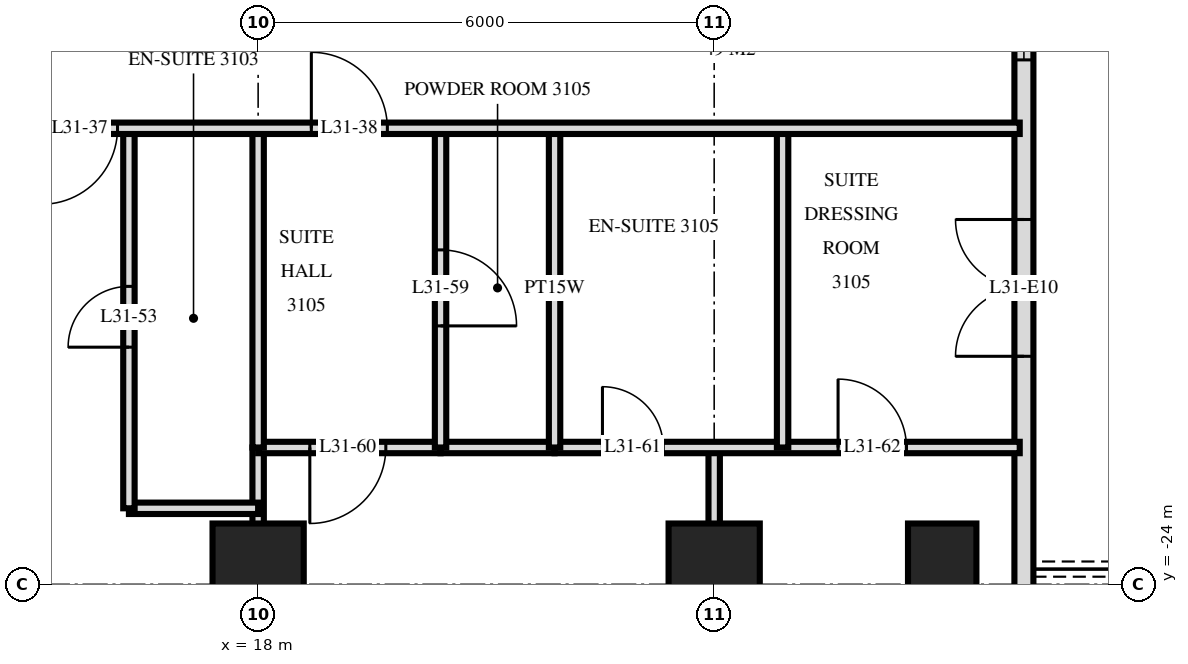
"""IFC4 building model, lengths in metres.
Left out: names, types, materials, properties, quantities, classifications, styles, units other than length and angle.
Written with IfcOpenShell. Run it as: python <this file> out.ifc"""

import sys

from ifc_helpers import new_model, si_unit, direction, frame, frame_2d, origin, origin_2d, place, context, subcontext, project, spatial, rectangle, extrude, element, fill, save


model = new_model("IFC4")
c1 = context("Model", 3, precision=1e-05, world=origin(), true_north=direction((0.0, 1.0)))
c2 = subcontext(c1, "Body", "Model", "MODEL_VIEW")
j1 = project(units=[si_unit("LENGTHUNIT", "METRE"), si_unit("PLANEANGLEUNIT", "RADIAN")], contexts=[c1])
p1 = place(None, origin())
s1 = spatial("IfcSite", under=j1, at=p1, CompositionType="ELEMENT")
p2 = place(p1, origin())
s2 = spatial("IfcBuilding", under=s1, at=p2, CompositionType="ELEMENT")
p3 = place(p2, frame((0.0, 0.0, 123.6)))
s3 = spatial("IfcBuildingStorey", under=s2, at=p3, CompositionType="ELEMENT", Elevation=123.6)
for number, where, z_axis, x_axis in (
    (1, (18.0, -23.8, 0.0), (0.0, 0.0, 1.0), (1.0, 0.0, 0.0)),
    (2, (24.0, -23.8, 0.0), (0.0, 0.0, 1.0), (1.0, 0.0, 0.0)),
):
    element("IfcColumn", number, at=place(p3, frame(where, z_axis=z_axis, x_axis=x_axis)), inside=s3, PredefinedType="COLUMN", context=c2, shape_type="SweptSolid", body=[
        extrude(rectangle(XDim=1.2, YDim=1.2, at=origin_2d()), origin(), (0.0, 0.0, 1.0), 3.6),
    ])
p4 = place(p3, frame((27.0, -23.8, 0.0), z_axis=(0.0, 0.0, 1.0), x_axis=(0.0, 1.0, 0.0)))
e3 = element("IfcColumn", 3, at=p4, inside=s3, PredefinedType="COLUMN", context=c2, shape_type="SweptSolid", body=[
    extrude(rectangle(XDim=1.2, YDim=0.9, at=origin_2d()), origin(), (0.0, 0.0, 1.0), 3.6),
])
p5 = place(p3, frame((28.075, -29.275, 0.0), z_axis=(0.0, 0.0, 1.0), x_axis=(0.0, 1.0, 0.0)))
e4 = element("IfcWall", 4, at=p5, inside=s3, PredefinedType="SOLIDWALL", context=c2, shape_type="SweptSolid", body=[
    extrude(rectangle(XDim=25.951, YDim=0.25, at=frame_2d((12.975, 0.0))), origin(), (0.0, 0.0, 1.0), 3.32),
])
p6 = place(p5, frame((0.575, 0.0, 0.0)))
e5 = element("IfcOpeningElement", 5, at=p6, cuts=e4, PredefinedType="OPENING", context=c2, shape_type="SweptSolid", body=[
    extrude(rectangle(XDim=1.8, YDim=2.4, at=frame_2d((0.9, 1.2))), frame((0.0, 0.135, 0.0), z_axis=(0.0, -1.0, 0.0), x_axis=(1.0, 0.0, 0.0)), (0.0, 0.0, 1.0), 0.27),
])
p7 = place(p5, frame((3.325, 0.0, 0.3)))
e6 = element("IfcOpeningElement", 6, at=p7, cuts=e4, PredefinedType="OPENING", context=c2, shape_type="SweptSolid", body=[
    extrude(rectangle(XDim=1.8, YDim=2.1, at=frame_2d((0.9, 1.05))), frame((0.0, 0.135, 0.0), z_axis=(0.0, -1.0, 0.0), x_axis=(1.0, 0.0, 0.0)), (0.0, 0.0, 1.0), 0.27),
])
p8 = place(p5, frame((8.275, 0.0, 0.0)))
e7 = element("IfcOpeningElement", 7, at=p8, cuts=e4, PredefinedType="OPENING", context=c2, shape_type="SweptSolid", body=[
    extrude(rectangle(XDim=1.8, YDim=2.4, at=frame_2d((0.9, 1.2))), frame((0.0, 0.135, 0.0), z_axis=(0.0, -1.0, 0.0), x_axis=(1.0, 0.0, 0.0)), (0.0, 0.0, 1.0), 0.27),
])
p9 = place(p5, frame((12.175, 0.0, 0.3)))
e8 = element("IfcOpeningElement", 8, at=p9, cuts=e4, PredefinedType="OPENING", context=c2, shape_type="SweptSolid", body=[
    extrude(rectangle(XDim=1.2, YDim=2.1, at=frame_2d((0.6, 1.05))), frame((0.0, 0.135, 0.0), z_axis=(0.0, -1.0, 0.0), x_axis=(1.0, 0.0, 0.0)), (0.0, 0.0, 1.0), 0.27),
])
p10 = place(p5, frame((16.375, 0.0, 0.0)))
e9 = element("IfcOpeningElement", 9, at=p10, cuts=e4, PredefinedType="OPENING", context=c2, shape_type="SweptSolid", body=[
    extrude(rectangle(XDim=1.8, YDim=2.4, at=frame_2d((0.9, 1.2))), frame((0.0, 0.135, 0.0), z_axis=(0.0, -1.0, 0.0), x_axis=(1.0, 0.0, 0.0)), (0.0, 0.0, 1.0), 0.27),
])
p11 = place(p3, frame((24.9, -22.2, 0.0), z_axis=(0.0, 0.0, 1.0), x_axis=(0.0, 1.0, 0.0)))
e10 = element("IfcWall", 10, at=p11, inside=s3, PredefinedType="PARTITIONING", context=c2, shape_type="SweptSolid", body=[
    extrude(rectangle(XDim=4.2, YDim=0.15, at=frame_2d((2.1, 0.0))), origin(), (0.0, 0.0, 1.0), 3.32),
])
p12 = place(p3, frame((24.0, -33.557, 0.0), z_axis=(0.0, 0.0, 1.0), x_axis=(0.0, 1.0, 0.0)))
e11 = element("IfcWall", 11, at=p12, inside=s3, PredefinedType="PARTITIONING", context=c2, shape_type="SweptSolid", body=[
    extrude(rectangle(XDim=11.357, YDim=0.15, at=frame_2d((5.678, 0.0))), origin(), (0.0, 0.0, 1.0), 3.32),
])
p13 = place(p12, frame((5.137, 0.0, 0.0)))
e12 = element("IfcOpeningElement", 12, at=p13, cuts=e11, PredefinedType="OPENING", context=c2, shape_type="SweptSolid", body=[
    extrude(rectangle(XDim=0.9, YDim=2.1, at=frame_2d((0.45, 1.05))), frame((0.0, 0.085, 0.0), z_axis=(0.0, -1.0, 0.0), x_axis=(1.0, 0.0, 0.0)), (0.0, 0.0, 1.0), 0.17),
])
p14 = place(p3, frame((21.9, -22.2, 0.0), z_axis=(0.0, 0.0, 1.0), x_axis=(0.0, 1.0, 0.0)))
e13 = element("IfcWall", 13, at=p14, inside=s3, PredefinedType="PLUMBINGWALL", context=c2, shape_type="SweptSolid", body=[
    extrude(rectangle(XDim=4.2, YDim=0.15, at=frame_2d((2.1, 0.0))), origin(), (0.0, 0.0, 1.0), 3.32),
])
p15 = place(p3, frame((20.4, -22.2, 0.0), z_axis=(0.0, 0.0, 1.0), x_axis=(0.0, 1.0, 0.0)))
e14 = element("IfcWall", 14, at=p15, inside=s3, PredefinedType="PARTITIONING", context=c2, shape_type="SweptSolid", body=[
    extrude(rectangle(XDim=4.2, YDim=0.15, at=frame_2d((2.1, 0.0))), origin(), (0.0, 0.0, 1.0), 3.32),
])
p16 = place(p15, frame((1.6, 0.0, 0.0)))
e15 = element("IfcOpeningElement", 15, at=p16, cuts=e14, PredefinedType="OPENING", context=c2, shape_type="SweptSolid", body=[
    extrude(rectangle(XDim=1.0, YDim=2.1, at=frame_2d((0.5, 1.05))), frame((0.0, 0.085, 0.0), z_axis=(0.0, -1.0, 0.0), x_axis=(1.0, 0.0, 0.0)), (0.0, 0.0, 1.0), 0.17),
])
p17 = place(p3, frame((18.0, -22.2, 0.0), z_axis=(0.0, 0.0, 1.0), x_axis=(0.0, 1.0, 0.0)))
e16 = element("IfcWall", 16, at=p17, inside=s3, PredefinedType="PARTITIONING", context=c2, shape_type="SweptSolid", body=[
    extrude(rectangle(XDim=4.2, YDim=0.15, at=frame_2d((2.1, 0.0))), origin(), (0.0, 0.0, 1.0), 3.32),
])
p18 = place(p3, frame((18.0, -33.62, 0.0), z_axis=(0.0, 0.0, 1.0), x_axis=(0.0, 1.0, 0.0)))
e17 = element("IfcWall", 17, at=p18, inside=s3, PredefinedType="PARTITIONING", context=c2, shape_type="SweptSolid", body=[
    extrude(rectangle(XDim=11.42, YDim=0.15, at=frame_2d((5.71, 0.0))), origin(), (0.0, 0.0, 1.0), 3.32),
])
p19 = place(p3, frame((16.3, -23.0, 0.0), z_axis=(0.0, 0.0, 1.0), x_axis=(0.0, 1.0, 0.0)))
e18 = element("IfcWall", 18, at=p19, inside=s3, PredefinedType="PARTITIONING", context=c2, shape_type="SweptSolid", body=[
    extrude(rectangle(XDim=5.0, YDim=0.15, at=frame_2d((2.5, 0.0))), origin(), (0.0, 0.0, 1.0), 3.32),
])
p20 = place(p19, frame((2.12, 0.0, 0.0)))
e19 = element("IfcOpeningElement", 19, at=p20, cuts=e18, PredefinedType="OPENING", context=c2, shape_type="SweptSolid", body=[
    extrude(rectangle(XDim=0.8, YDim=2.1, at=frame_2d((0.4, 1.05))), frame((0.0, 0.085, 0.0), z_axis=(0.0, -1.0, 0.0), x_axis=(1.0, 0.0, 0.0)), (0.0, 0.0, 1.0), 0.17),
])
p21 = place(p3, frame((16.3, -23.0, 0.0), z_axis=(0.0, 0.0, 1.0), x_axis=(1.0, 0.0, 0.0)))
e20 = element("IfcWall", 20, at=p21, inside=s3, PredefinedType="PARTITIONING", context=c2, shape_type="SweptSolid", body=[
    extrude(rectangle(XDim=1.7, YDim=0.15, at=frame_2d((0.85, 0.0))), origin(), (0.0, 0.0, 1.0), 3.32),
])
p22 = place(p3, frame((18.0, -22.2, 0.0), z_axis=(0.0, 0.0, 1.0), x_axis=(1.0, 0.0, 0.0)))
e21 = element("IfcWall", 21, at=p22, inside=s3, PredefinedType="PARTITIONING", context=c2, shape_type="SweptSolid", body=[
    extrude(rectangle(XDim=2.4, YDim=0.15, at=frame_2d((1.2, 0.0))), origin(), (0.0, 0.0, 1.0), 3.32),
])
p23 = place(p22, frame((0.68, 0.0, 0.0)))
e22 = element("IfcOpeningElement", 22, at=p23, cuts=e21, PredefinedType="OPENING", context=c2, shape_type="SweptSolid", body=[
    extrude(rectangle(XDim=1.0, YDim=2.1, at=frame_2d((0.5, 1.05))), frame((0.0, 0.085, 0.0), z_axis=(0.0, -1.0, 0.0), x_axis=(1.0, 0.0, 0.0)), (0.0, 0.0, 1.0), 0.17),
])
p24 = place(p3, frame((21.9, -22.2, 0.0), z_axis=(0.0, 0.0, 1.0), x_axis=(1.0, 0.0, 0.0)))
e23 = element("IfcWall", 23, at=p24, inside=s3, PredefinedType="PARTITIONING", context=c2, shape_type="SweptSolid", body=[
    extrude(rectangle(XDim=6.12, YDim=0.15, at=frame_2d((3.06, 0.0))), origin(), (0.0, 0.0, 1.0), 3.32),
])
p25 = place(p24, frame((0.63, 0.0, 0.0)))
e24 = element("IfcOpeningElement", 24, at=p25, cuts=e23, PredefinedType="OPENING", context=c2, shape_type="SweptSolid", body=[
    extrude(rectangle(XDim=0.8, YDim=2.1, at=frame_2d((0.4, 1.05))), frame((0.0, 0.085, 0.0), z_axis=(0.0, -1.0, 0.0), x_axis=(1.0, 0.0, 0.0)), (0.0, 0.0, 1.0), 0.17),
])
p26 = place(p24, frame((3.73, 0.0, 0.0)))
e25 = element("IfcOpeningElement", 25, at=p26, cuts=e23, PredefinedType="OPENING", context=c2, shape_type="SweptSolid", body=[
    extrude(rectangle(XDim=0.9, YDim=2.1, at=frame_2d((0.45, 1.05))), frame((0.0, 0.085, 0.0), z_axis=(0.0, -1.0, 0.0), x_axis=(1.0, 0.0, 0.0)), (0.0, 0.0, 1.0), 0.17),
])
p27 = place(p3, frame((20.4, -22.2, 0.0), z_axis=(0.0, 0.0, 1.0), x_axis=(1.0, 0.0, 0.0)))
e26 = element("IfcWall", 26, at=p27, inside=s3, PredefinedType="PLUMBINGWALL", context=c2, shape_type="SweptSolid", body=[
    extrude(rectangle(XDim=1.5, YDim=0.15, at=frame_2d((0.75, 0.0))), origin(), (0.0, 0.0, 1.0), 3.32),
])
p28 = place(p3, frame((-28.02, -18.0, 0.0), z_axis=(0.0, 0.0, 1.0), x_axis=(1.0, 0.0, 0.0)))
e27 = element("IfcWall", 27, at=p28, inside=s3, PredefinedType="PARTITIONING", context=c2, shape_type="SweptSolid", body=[
    extrude(rectangle(XDim=56.04, YDim=0.15, at=frame_2d((28.02, 0.0))), origin(), (0.0, 0.0, 1.0), 3.32),
])
p29 = place(p28, frame((13.17, 0.0, 0.0)))
e28 = element("IfcOpeningElement", 28, at=p29, cuts=e27, PredefinedType="OPENING", context=c2, shape_type="SweptSolid", body=[
    extrude(rectangle(XDim=1.0, YDim=2.1, at=frame_2d((0.5, 1.05))), frame((0.0, 0.085, 0.0), z_axis=(0.0, -1.0, 0.0), x_axis=(1.0, 0.0, 0.0)), (0.0, 0.0, 1.0), 0.17),
])
p30 = place(p28, frame((11.32, 0.0, 0.0)))
e29 = element("IfcOpeningElement", 29, at=p30, cuts=e27, PredefinedType="OPENING", context=c2, shape_type="SweptSolid", body=[
    extrude(rectangle(XDim=1.0, YDim=2.1, at=frame_2d((0.5, 1.05))), frame((0.0, 0.085, 0.0), z_axis=(0.0, -1.0, 0.0), x_axis=(1.0, 0.0, 0.0)), (0.0, 0.0, 1.0), 0.17),
])
p31 = place(p28, frame((41.87, 0.0, 0.0)))
e30 = element("IfcOpeningElement", 30, at=p31, cuts=e27, PredefinedType="OPENING", context=c2, shape_type="SweptSolid", body=[
    extrude(rectangle(XDim=1.0, YDim=2.1, at=frame_2d((0.5, 1.05))), frame((0.0, 0.085, 0.0), z_axis=(0.0, -1.0, 0.0), x_axis=(1.0, 0.0, 0.0)), (0.0, 0.0, 1.0), 0.17),
])
p32 = place(p28, frame((43.17, 0.0, 0.0)))
e31 = element("IfcOpeningElement", 31, at=p32, cuts=e27, PredefinedType="OPENING", context=c2, shape_type="SweptSolid", body=[
    extrude(rectangle(XDim=1.0, YDim=2.1, at=frame_2d((0.5, 1.05))), frame((0.0, 0.085, 0.0), z_axis=(0.0, -1.0, 0.0), x_axis=(1.0, 0.0, 0.0)), (0.0, 0.0, 1.0), 0.17),
])
p33 = place(p28, frame((46.72, 0.0, 0.0)))
e32 = element("IfcOpeningElement", 32, at=p33, cuts=e27, PredefinedType="OPENING", context=c2, shape_type="SweptSolid", body=[
    extrude(rectangle(XDim=1.0, YDim=2.1, at=frame_2d((0.5, 1.05))), frame((0.0, 0.085, 0.0), z_axis=(0.0, -1.0, 0.0), x_axis=(1.0, 0.0, 0.0)), (0.0, 0.0, 1.0), 0.17),
])
p34 = place(p28, frame((21.52, 0.0, 0.0)))
e33 = element("IfcOpeningElement", 33, at=p34, cuts=e27, PredefinedType="OPENING", context=c2, shape_type="SweptSolid", body=[
    extrude(rectangle(XDim=1.0, YDim=2.1, at=frame_2d((0.5, 1.05))), frame((0.0, 0.085, 0.0), z_axis=(0.0, -1.0, 0.0), x_axis=(1.0, 0.0, 0.0)), (0.0, 0.0, 1.0), 0.17),
])
p35 = place(p28, frame((33.52, 0.0, 0.0)))
e34 = element("IfcOpeningElement", 34, at=p35, cuts=e27, PredefinedType="OPENING", context=c2, shape_type="SweptSolid", body=[
    extrude(rectangle(XDim=1.0, YDim=2.1, at=frame_2d((0.5, 1.05))), frame((0.0, 0.085, 0.0), z_axis=(0.0, -1.0, 0.0), x_axis=(1.0, 0.0, 0.0)), (0.0, 0.0, 1.0), 0.17),
])
p36 = place(p8, origin())
e35 = element("IfcDoor", 35, at=p36, inside=s3, OperationType="DOUBLE_DOOR_SINGLE_SWING", PredefinedType="DOOR", context=c2, shape_type="SweptSolid", body=[
    extrude(rectangle(XDim=1.8, YDim=2.4, at=frame_2d((0.9, 1.2))), frame((0.0, 0.025, 0.0), z_axis=(0.0, -1.0, 0.0), x_axis=(1.0, 0.0, 0.0)), (0.0, 0.0, 1.0), 0.05),
])
fill(e7, e35)
p37 = place(p9, origin())
e36 = element("IfcWindow", 36, at=p37, inside=s3, PartitioningType="SINGLE_PANEL", PredefinedType="WINDOW", context=c2, shape_type="SweptSolid", body=[
    extrude(rectangle(XDim=1.2, YDim=2.1, at=frame_2d((0.6, 1.05))), frame((0.0, 0.03, 0.0), z_axis=(0.0, -1.0, 0.0), x_axis=(1.0, 0.0, 0.0)), (0.0, 0.0, 1.0), 0.06),
])
fill(e8, e36)
p38 = place(p32, frame((0.5, 0.0, 0.0), z_axis=(0.0, 0.0, 1.0), x_axis=(-1.0, 0.0, 0.0)))
e37 = element("IfcDoor", 37, at=p38, inside=s3, OperationType="SINGLE_SWING_LEFT", PredefinedType="DOOR", context=c2, shape_type="SweptSolid", body=[
    extrude(rectangle(XDim=1.0, YDim=2.1, at=frame_2d((0.0, 1.05))), frame((0.0, -0.025, 0.0), z_axis=(0.0, 1.0, 0.0), x_axis=(-1.0, 0.0, 0.0)), (0.0, 0.0, 1.0), 0.05),
])
fill(e31, e37)
p39 = place(p33, origin())
e38 = element("IfcDoor", 38, at=p39, inside=s3, OperationType="SINGLE_SWING_RIGHT", PredefinedType="DOOR", context=c2, shape_type="SweptSolid", body=[
    extrude(rectangle(XDim=1.0, YDim=2.1, at=frame_2d((0.5, 1.05))), frame((0.0, 0.025, 0.0), z_axis=(0.0, -1.0, 0.0), x_axis=(1.0, 0.0, 0.0)), (0.0, 0.0, 1.0), 0.05),
])
fill(e32, e38)
p40 = place(p20, origin())
e39 = element("IfcDoor", 39, at=p40, inside=s3, OperationType="SINGLE_SWING_RIGHT", PredefinedType="DOOR", context=c2, shape_type="SweptSolid", body=[
    extrude(rectangle(XDim=0.8, YDim=2.1, at=frame_2d((0.4, 1.05))), frame((0.0, 0.025, 0.0), z_axis=(0.0, -1.0, 0.0), x_axis=(1.0, 0.0, 0.0)), (0.0, 0.0, 1.0), 0.05),
])
fill(e19, e39)
p41 = place(p16, frame((0.5, 0.0, 0.0), z_axis=(0.0, 0.0, 1.0), x_axis=(-1.0, 0.0, 0.0)))
e40 = element("IfcDoor", 40, at=p41, inside=s3, OperationType="SINGLE_SWING_LEFT", PredefinedType="DOOR", context=c2, shape_type="SweptSolid", body=[
    extrude(rectangle(XDim=1.0, YDim=2.1, at=frame_2d((0.0, 1.05))), frame((0.0, -0.025, 0.0), z_axis=(0.0, 1.0, 0.0), x_axis=(-1.0, 0.0, 0.0)), (0.0, 0.0, 1.0), 0.05),
])
fill(e15, e40)
p42 = place(p23, frame((0.5, 0.0, 0.0), z_axis=(0.0, 0.0, 1.0), x_axis=(-1.0, 0.0, 0.0)))
e41 = element("IfcDoor", 41, at=p42, inside=s3, OperationType="SINGLE_SWING_LEFT", PredefinedType="DOOR", context=c2, shape_type="SweptSolid", body=[
    extrude(rectangle(XDim=1.0, YDim=2.1, at=frame_2d((0.0, 1.05))), frame((0.0, -0.025, 0.0), z_axis=(0.0, 1.0, 0.0), x_axis=(-1.0, 0.0, 0.0)), (0.0, 0.0, 1.0), 0.05),
])
fill(e22, e41)
p43 = place(p25, origin())
e42 = element("IfcDoor", 42, at=p43, inside=s3, OperationType="SINGLE_SWING_RIGHT", PredefinedType="DOOR", context=c2, shape_type="SweptSolid", body=[
    extrude(rectangle(XDim=0.8, YDim=2.1, at=frame_2d((0.4, 1.05))), frame((0.0, 0.025, 0.0), z_axis=(0.0, -1.0, 0.0), x_axis=(1.0, 0.0, 0.0)), (0.0, 0.0, 1.0), 0.05),
])
fill(e24, e42)
p44 = place(p26, origin())
e43 = element("IfcDoor", 43, at=p44, inside=s3, OperationType="SINGLE_SWING_RIGHT", PredefinedType="DOOR", context=c2, shape_type="SweptSolid", body=[
    extrude(rectangle(XDim=0.9, YDim=2.1, at=frame_2d((0.45, 1.05))), frame((0.0, 0.025, 0.0), z_axis=(0.0, -1.0, 0.0), x_axis=(1.0, 0.0, 0.0)), (0.0, 0.0, 1.0), 0.05),
])
fill(e25, e43)
save(model, sys.argv[1])
